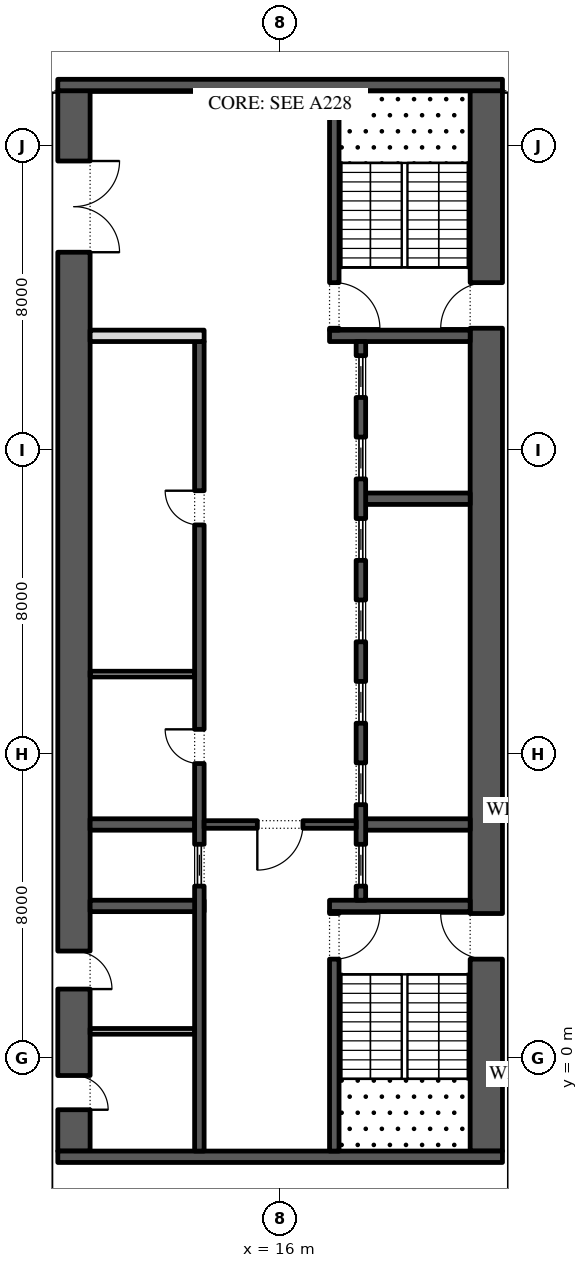
"""IFC4 building model, lengths in metres.
Left out: names, types, materials, properties, quantities, classifications, styles, units other than length and angle.
Written with IfcOpenShell. Run it as: python <this file> out.ifc"""

import sys

from ifc_helpers import new_model, si_unit, direction, frame, frame_2d, origin, place, context, subcontext, project, spatial, rectangle, extrude, element, fill, save


model = new_model("IFC4")
c1 = context("Model", 3, precision=1e-05, world=origin(), true_north=direction((0.0, 1.0)))
c2 = subcontext(c1, "Body", "Model", "MODEL_VIEW")
j1 = project(units=[si_unit("LENGTHUNIT", "METRE"), si_unit("PLANEANGLEUNIT", "RADIAN")], contexts=[c1])
p1 = place(None, origin())
s1 = spatial("IfcSite", under=j1, at=p1, CompositionType="ELEMENT")
p2 = place(p1, origin())
s2 = spatial("IfcBuilding", under=s1, at=p2, CompositionType="ELEMENT")
p3 = place(p2, frame((0.0, 0.0, 118.2)))
s3 = spatial("IfcBuildingStorey", under=s2, at=p3, CompositionType="ELEMENT", Elevation=118.2)
p4 = place(p3, frame((21.425, -2.45, 0.0), z_axis=(0.0, 0.0, 1.0), x_axis=(0.0, 1.0, 0.0)))
e1 = element("IfcWall", 1, at=p4, inside=s3, PredefinedType="SHEAR", context=c2, shape_type="SweptSolid", body=[
    extrude(rectangle(XDim=27.9, YDim=0.85, at=frame_2d((13.95, 0.0))), origin(), (0.0, 0.0, 1.0), 4.0),
])
p5 = place(p4, frame((5.05, 0.0, 0.0)))
e2 = element("IfcOpeningElement", 2, at=p5, cuts=e1, PredefinedType="OPENING", context=c2, shape_type="SweptSolid", body=[
    extrude(rectangle(XDim=1.2, YDim=2.1, at=frame_2d((0.6, 1.05))), frame((0.0, 0.435, 0.0), z_axis=(0.0, -1.0, 0.0), x_axis=(1.0, 0.0, 0.0)), (0.0, 0.0, 1.0), 0.87),
])
p6 = place(p4, frame((21.65, 0.0, 0.0)))
e3 = element("IfcOpeningElement", 3, at=p6, cuts=e1, PredefinedType="OPENING", context=c2, shape_type="SweptSolid", body=[
    extrude(rectangle(XDim=1.2, YDim=2.1, at=frame_2d((0.6, 1.05))), frame((0.0, 0.435, 0.0), z_axis=(0.0, -1.0, 0.0), x_axis=(1.0, 0.0, 0.0)), (0.0, 0.0, 1.0), 0.87),
])
p7 = place(p3, frame((10.575, -2.45, 0.0), z_axis=(0.0, 0.0, 1.0), x_axis=(0.0, 1.0, 0.0)))
e4 = element("IfcWall", 4, at=p7, inside=s3, PredefinedType="SHEAR", context=c2, shape_type="SweptSolid", body=[
    extrude(rectangle(XDim=27.9, YDim=0.85, at=frame_2d((13.95, 0.0))), origin(), (0.0, 0.0, 1.0), 4.0),
])
p8 = place(p7, frame((23.65, 0.0, 0.0)))
e5 = element("IfcOpeningElement", 5, at=p8, cuts=e4, PredefinedType="OPENING", context=c2, shape_type="SweptSolid", body=[
    extrude(rectangle(XDim=2.4, YDim=2.1, at=frame_2d((1.2, 1.05))), frame((0.0, 0.435, 0.0), z_axis=(0.0, -1.0, 0.0), x_axis=(1.0, 0.0, 0.0)), (0.0, 0.0, 1.0), 0.87),
])
p9 = place(p7, frame((1.087, 0.0, 0.0)))
e6 = element("IfcOpeningElement", 6, at=p9, cuts=e4, PredefinedType="OPENING", context=c2, shape_type="SweptSolid", body=[
    extrude(rectangle(XDim=0.9, YDim=2.1, at=frame_2d((0.45, 1.05))), frame((0.0, 0.435, 0.0), z_axis=(0.0, -1.0, 0.0), x_axis=(1.0, 0.0, 0.0)), (0.0, 0.0, 1.0), 0.87),
])
p10 = place(p7, frame((4.262, 0.0, 0.0)))
e7 = element("IfcOpeningElement", 7, at=p10, cuts=e4, PredefinedType="OPENING", context=c2, shape_type="SweptSolid", body=[
    extrude(rectangle(XDim=1.0, YDim=2.1, at=frame_2d((0.5, 1.05))), frame((0.0, 0.435, 0.0), z_axis=(0.0, -1.0, 0.0), x_axis=(1.0, 0.0, 0.0)), (0.0, 0.0, 1.0), 0.87),
])
for number, where, z_axis, x_axis in (
    (8, (10.15, -2.6, 0.0), (0.0, 0.0, 1.0), (1.0, 0.0, 0.0)),
    (9, (10.15, 25.6, 0.0), (0.0, 0.0, 1.0), (1.0, 0.0, 0.0)),
):
    element("IfcWall", number, at=place(p3, frame(where, z_axis=z_axis, x_axis=x_axis)), inside=s3, PredefinedType="SHEAR", context=c2, shape_type="SweptSolid", body=[
        extrude(rectangle(XDim=11.7, YDim=0.3, at=frame_2d((5.85, 0.0))), origin(), (0.0, 0.0, 1.0), 4.0),
    ])
p11 = place(p3, frame((17.3, 4.0, 0.0), z_axis=(0.0, 0.0, 1.0), x_axis=(1.0, 0.0, 0.0)))
e10 = element("IfcWall", 10, at=p11, inside=s3, PredefinedType="SHEAR", context=c2, shape_type="SweptSolid", body=[
    extrude(rectangle(XDim=3.7, YDim=0.3, at=frame_2d((1.85, 0.0))), origin(), (0.0, 0.0, 1.0), 4.0),
])
p12 = place(p3, frame((17.425, -2.45, 0.0), z_axis=(0.0, 0.0, 1.0), x_axis=(0.0, 1.0, 0.0)))
e11 = element("IfcWall", 11, at=p12, inside=s3, PredefinedType="SHEAR", context=c2, shape_type="SweptSolid", body=[
    extrude(rectangle(XDim=6.3, YDim=0.25, at=frame_2d((3.15, 0.0))), origin(), (0.0, 0.0, 1.0), 4.0),
])
p13 = place(p12, frame((5.05, 0.0, 0.0)))
e12 = element("IfcOpeningElement", 12, at=p13, cuts=e11, PredefinedType="OPENING", context=c2, shape_type="SweptSolid", body=[
    extrude(rectangle(XDim=1.2, YDim=2.1, at=frame_2d((0.6, 1.05))), frame((0.0, 0.135, 0.0), z_axis=(0.0, -1.0, 0.0), x_axis=(1.0, 0.0, 0.0)), (0.0, 0.0, 1.0), 0.27),
])
p14 = place(p3, frame((17.3, 19.0, 0.0), z_axis=(0.0, 0.0, 1.0), x_axis=(1.0, 0.0, 0.0)))
e13 = element("IfcWall", 13, at=p14, inside=s3, PredefinedType="SHEAR", context=c2, shape_type="SweptSolid", body=[
    extrude(rectangle(XDim=3.7, YDim=0.3, at=frame_2d((1.85, 0.0))), origin(), (0.0, 0.0, 1.0), 4.0),
])
p15 = place(p3, frame((17.425, 19.15, 0.0), z_axis=(0.0, 0.0, 1.0), x_axis=(0.0, 1.0, 0.0)))
e14 = element("IfcWall", 14, at=p15, inside=s3, PredefinedType="SHEAR", context=c2, shape_type="SweptSolid", body=[
    extrude(rectangle(XDim=6.3, YDim=0.25, at=frame_2d((3.15, 0.0))), origin(), (0.0, 0.0, 1.0), 4.0),
])
p16 = place(p15, frame((0.05, 0.0, 0.0)))
e15 = element("IfcOpeningElement", 15, at=p16, cuts=e14, PredefinedType="OPENING", context=c2, shape_type="SweptSolid", body=[
    extrude(rectangle(XDim=1.2, YDim=2.1, at=frame_2d((0.6, 1.05))), frame((0.0, 0.135, 0.0), z_axis=(0.0, -1.0, 0.0), x_axis=(1.0, 0.0, 0.0)), (0.0, 0.0, 1.0), 0.27),
])
for number, where, z_axis, x_axis in (
    (16, (18.25, 6.143, 0.0), (0.0, 0.0, 1.0), (1.0, 0.0, 0.0)),
    (17, (18.25, 14.714, 0.0), (0.0, 0.0, 1.0), (1.0, 0.0, 0.0)),
):
    element("IfcWall", number, at=place(p3, frame(where, z_axis=z_axis, x_axis=x_axis)), inside=s3, PredefinedType="SHEAR", context=c2, shape_type="SweptSolid", body=[
        extrude(rectangle(XDim=2.75, YDim=0.3, at=frame_2d((1.375, 0.0))), origin(), (0.0, 0.0, 1.0), 4.0),
    ])
p17 = place(p3, frame((18.125, 4.15, 0.0), z_axis=(0.0, 0.0, 1.0), x_axis=(0.0, 1.0, 0.0)))
e18 = element("IfcWall", 18, at=p17, inside=s3, PredefinedType="SHEAR", context=c2, shape_type="SweptSolid", body=[
    extrude(rectangle(XDim=14.7, YDim=0.25, at=frame_2d((7.35, 0.0))), origin(), (0.0, 0.0, 1.0), 4.0),
])
p18 = place(p17, frame((0.371, 0.0, 0.0)))
e19 = element("IfcOpeningElement", 19, at=p18, cuts=e18, PredefinedType="OPENING", context=c2, shape_type="SweptSolid", body=[
    extrude(rectangle(XDim=1.1, YDim=2.1, at=frame_2d((0.55, 1.05))), frame((0.0, 0.135, 0.0), z_axis=(0.0, -1.0, 0.0), x_axis=(1.0, 0.0, 0.0)), (0.0, 0.0, 1.0), 0.27),
])
p19 = place(p17, frame((2.514, 0.0, 0.0)))
e20 = element("IfcOpeningElement", 20, at=p19, cuts=e18, PredefinedType="OPENING", context=c2, shape_type="SweptSolid", body=[
    extrude(rectangle(XDim=1.1, YDim=2.1, at=frame_2d((0.55, 1.05))), frame((0.0, 0.135, 0.0), z_axis=(0.0, -1.0, 0.0), x_axis=(1.0, 0.0, 0.0)), (0.0, 0.0, 1.0), 0.27),
])
p20 = place(p17, frame((4.657, 0.0, 0.0)))
e21 = element("IfcOpeningElement", 21, at=p20, cuts=e18, PredefinedType="OPENING", context=c2, shape_type="SweptSolid", body=[
    extrude(rectangle(XDim=1.1, YDim=2.1, at=frame_2d((0.55, 1.05))), frame((0.0, 0.135, 0.0), z_axis=(0.0, -1.0, 0.0), x_axis=(1.0, 0.0, 0.0)), (0.0, 0.0, 1.0), 0.27),
])
p21 = place(p17, frame((6.8, 0.0, 0.0)))
e22 = element("IfcOpeningElement", 22, at=p21, cuts=e18, PredefinedType="OPENING", context=c2, shape_type="SweptSolid", body=[
    extrude(rectangle(XDim=1.1, YDim=2.1, at=frame_2d((0.55, 1.05))), frame((0.0, 0.135, 0.0), z_axis=(0.0, -1.0, 0.0), x_axis=(1.0, 0.0, 0.0)), (0.0, 0.0, 1.0), 0.27),
])
p22 = place(p17, frame((8.943, 0.0, 0.0)))
e23 = element("IfcOpeningElement", 23, at=p22, cuts=e18, PredefinedType="OPENING", context=c2, shape_type="SweptSolid", body=[
    extrude(rectangle(XDim=1.1, YDim=2.1, at=frame_2d((0.55, 1.05))), frame((0.0, 0.135, 0.0), z_axis=(0.0, -1.0, 0.0), x_axis=(1.0, 0.0, 0.0)), (0.0, 0.0, 1.0), 0.27),
])
p23 = place(p17, frame((11.086, 0.0, 0.0)))
e24 = element("IfcOpeningElement", 24, at=p23, cuts=e18, PredefinedType="OPENING", context=c2, shape_type="SweptSolid", body=[
    extrude(rectangle(XDim=1.1, YDim=2.1, at=frame_2d((0.55, 1.05))), frame((0.0, 0.135, 0.0), z_axis=(0.0, -1.0, 0.0), x_axis=(1.0, 0.0, 0.0)), (0.0, 0.0, 1.0), 0.27),
])
p24 = place(p17, frame((13.229, 0.0, 0.0)))
e25 = element("IfcOpeningElement", 25, at=p24, cuts=e18, PredefinedType="OPENING", context=c2, shape_type="SweptSolid", body=[
    extrude(rectangle(XDim=1.1, YDim=2.1, at=frame_2d((0.55, 1.05))), frame((0.0, 0.135, 0.0), z_axis=(0.0, -1.0, 0.0), x_axis=(1.0, 0.0, 0.0)), (0.0, 0.0, 1.0), 0.27),
])
p25 = place(p3, frame((11.0, 4.0, 0.0), z_axis=(0.0, 0.0, 1.0), x_axis=(1.0, 0.0, 0.0)))
e26 = element("IfcWall", 26, at=p25, inside=s3, PredefinedType="SHEAR", context=c2, shape_type="SweptSolid", body=[
    extrude(rectangle(XDim=3.0, YDim=0.3, at=frame_2d((1.5, 0.0))), origin(), (0.0, 0.0, 1.0), 4.0),
])
p26 = place(p3, frame((11.0, 6.143, 0.0), z_axis=(0.0, 0.0, 1.0), x_axis=(1.0, 0.0, 0.0)))
e27 = element("IfcWall", 27, at=p26, inside=s3, PredefinedType="SHEAR", context=c2, shape_type="SweptSolid", body=[
    extrude(rectangle(XDim=2.75, YDim=0.3, at=frame_2d((1.375, 0.0))), origin(), (0.0, 0.0, 1.0), 4.0),
])
p27 = place(p3, frame((13.875, -2.45, 0.0), z_axis=(0.0, 0.0, 1.0), x_axis=(0.0, 1.0, 0.0)))
e28 = element("IfcWall", 28, at=p27, inside=s3, PredefinedType="SHEAR", context=c2, shape_type="SweptSolid", body=[
    extrude(rectangle(XDim=21.3, YDim=0.25, at=frame_2d((10.65, 0.0))), origin(), (0.0, 0.0, 1.0), 4.0),
])
p28 = place(p27, frame((10.196, 0.0, 0.0)))
e29 = element("IfcOpeningElement", 29, at=p28, cuts=e28, PredefinedType="OPENING", context=c2, shape_type="SweptSolid", body=[
    extrude(rectangle(XDim=0.9, YDim=2.1, at=frame_2d((0.45, 1.05))), frame((0.0, 0.135, 0.0), z_axis=(0.0, -1.0, 0.0), x_axis=(1.0, 0.0, 0.0)), (0.0, 0.0, 1.0), 0.27),
])
p29 = place(p27, frame((16.475, 0.0, 0.0)))
e30 = element("IfcOpeningElement", 30, at=p29, cuts=e28, PredefinedType="OPENING", context=c2, shape_type="SweptSolid", body=[
    extrude(rectangle(XDim=0.9, YDim=2.1, at=frame_2d((0.45, 1.05))), frame((0.0, 0.135, 0.0), z_axis=(0.0, -1.0, 0.0), x_axis=(1.0, 0.0, 0.0)), (0.0, 0.0, 1.0), 0.27),
])
p30 = place(p27, frame((6.971, 0.0, 0.0)))
e31 = element("IfcOpeningElement", 31, at=p30, cuts=e28, PredefinedType="OPENING", context=c2, shape_type="SweptSolid", body=[
    extrude(rectangle(XDim=1.1, YDim=2.1, at=frame_2d((0.55, 1.05))), frame((0.0, 0.135, 0.0), z_axis=(0.0, -1.0, 0.0), x_axis=(1.0, 0.0, 0.0)), (0.0, 0.0, 1.0), 0.27),
])
p31 = place(p3, frame((11.0, 19.0, 0.0), z_axis=(0.0, 0.0, 1.0), x_axis=(1.0, 0.0, 0.0)))
e32 = element("IfcWall", 32, at=p31, inside=s3, PredefinedType="PARTITIONING", context=c2, shape_type="SweptSolid", body=[
    extrude(rectangle(XDim=3.0, YDim=0.3, at=frame_2d((1.5, 0.0))), origin(), (0.0, 0.0, 1.0), 4.0),
])
p32 = place(p3, frame((11.0, 10.1, 0.0), z_axis=(0.0, 0.0, 1.0), x_axis=(1.0, 0.0, 0.0)))
e33 = element("IfcWall", 33, at=p32, inside=s3, PredefinedType="PARTITIONING", context=c2, shape_type="SweptSolid", body=[
    extrude(rectangle(XDim=2.75, YDim=0.15, at=frame_2d((1.375, 0.0))), origin(), (0.0, 0.0, 1.0), 4.0),
])
p33 = place(p3, frame((14.0, 6.143, 0.0), z_axis=(0.0, 0.0, 1.0), x_axis=(1.0, 0.0, 0.0)))
e34 = element("IfcWall", 34, at=p33, inside=s3, PredefinedType="SHEAR", context=c2, shape_type="SweptSolid", body=[
    extrude(rectangle(XDim=4.0, YDim=0.2, at=frame_2d((2.0, 0.0))), origin(), (0.0, 0.0, 1.0), 4.0),
])
p34 = place(p33, frame((1.4, 0.0, 0.0)))
e35 = element("IfcOpeningElement", 35, at=p34, cuts=e34, PredefinedType="OPENING", context=c2, shape_type="SweptSolid", body=[
    extrude(rectangle(XDim=1.2, YDim=2.1, at=frame_2d((0.6, 1.05))), frame((0.0, 0.11, 0.0), z_axis=(0.0, -1.0, 0.0), x_axis=(1.0, 0.0, 0.0)), (0.0, 0.0, 1.0), 0.22),
])
p35 = place(p3, frame((11.0, 0.7, 0.0), z_axis=(0.0, 0.0, 1.0), x_axis=(1.0, 0.0, 0.0)))
e36 = element("IfcWall", 36, at=p35, inside=s3, PredefinedType="PARTITIONING", context=c2, shape_type="SweptSolid", body=[
    extrude(rectangle(XDim=2.75, YDim=0.15, at=frame_2d((1.375, 0.0))), origin(), (0.0, 0.0, 1.0), 4.0),
])
p36 = place(p18, origin())
e37 = element("IfcDoor", 37, at=p36, inside=s3, OperationType="SLIDING_TO_LEFT", PredefinedType="DOOR", context=c2, shape_type="SweptSolid", body=[
    extrude(rectangle(XDim=1.1, YDim=2.1, at=frame_2d((0.55, 1.05))), frame((0.0, 0.025, 0.0), z_axis=(0.0, -1.0, 0.0), x_axis=(1.0, 0.0, 0.0)), (0.0, 0.0, 1.0), 0.05),
])
fill(e19, e37)
p37 = place(p19, origin())
e38 = element("IfcDoor", 38, at=p37, inside=s3, OperationType="SLIDING_TO_LEFT", PredefinedType="DOOR", context=c2, shape_type="SweptSolid", body=[
    extrude(rectangle(XDim=1.1, YDim=2.1, at=frame_2d((0.55, 1.05))), frame((0.0, 0.025, 0.0), z_axis=(0.0, -1.0, 0.0), x_axis=(1.0, 0.0, 0.0)), (0.0, 0.0, 1.0), 0.05),
])
fill(e20, e38)
p38 = place(p20, origin())
e39 = element("IfcDoor", 39, at=p38, inside=s3, OperationType="SLIDING_TO_LEFT", PredefinedType="DOOR", context=c2, shape_type="SweptSolid", body=[
    extrude(rectangle(XDim=1.1, YDim=2.1, at=frame_2d((0.55, 1.05))), frame((0.0, 0.025, 0.0), z_axis=(0.0, -1.0, 0.0), x_axis=(1.0, 0.0, 0.0)), (0.0, 0.0, 1.0), 0.05),
])
fill(e21, e39)
p39 = place(p21, origin())
e40 = element("IfcDoor", 40, at=p39, inside=s3, OperationType="SLIDING_TO_LEFT", PredefinedType="DOOR", context=c2, shape_type="SweptSolid", body=[
    extrude(rectangle(XDim=1.1, YDim=2.1, at=frame_2d((0.55, 1.05))), frame((0.0, 0.025, 0.0), z_axis=(0.0, -1.0, 0.0), x_axis=(1.0, 0.0, 0.0)), (0.0, 0.0, 1.0), 0.05),
])
fill(e22, e40)
p40 = place(p22, origin())
e41 = element("IfcDoor", 41, at=p40, inside=s3, OperationType="SLIDING_TO_LEFT", PredefinedType="DOOR", context=c2, shape_type="SweptSolid", body=[
    extrude(rectangle(XDim=1.1, YDim=2.1, at=frame_2d((0.55, 1.05))), frame((0.0, 0.025, 0.0), z_axis=(0.0, -1.0, 0.0), x_axis=(1.0, 0.0, 0.0)), (0.0, 0.0, 1.0), 0.05),
])
fill(e23, e41)
p41 = place(p23, origin())
e42 = element("IfcDoor", 42, at=p41, inside=s3, OperationType="SLIDING_TO_LEFT", PredefinedType="DOOR", context=c2, shape_type="SweptSolid", body=[
    extrude(rectangle(XDim=1.1, YDim=2.1, at=frame_2d((0.55, 1.05))), frame((0.0, 0.025, 0.0), z_axis=(0.0, -1.0, 0.0), x_axis=(1.0, 0.0, 0.0)), (0.0, 0.0, 1.0), 0.05),
])
fill(e24, e42)
p42 = place(p24, origin())
e43 = element("IfcDoor", 43, at=p42, inside=s3, OperationType="SLIDING_TO_LEFT", PredefinedType="DOOR", context=c2, shape_type="SweptSolid", body=[
    extrude(rectangle(XDim=1.1, YDim=2.1, at=frame_2d((0.55, 1.05))), frame((0.0, 0.025, 0.0), z_axis=(0.0, -1.0, 0.0), x_axis=(1.0, 0.0, 0.0)), (0.0, 0.0, 1.0), 0.05),
])
fill(e25, e43)
p43 = place(p28, origin())
e44 = element("IfcDoor", 44, at=p43, inside=s3, OperationType="SINGLE_SWING_LEFT", PredefinedType="DOOR", context=c2, shape_type="SweptSolid", body=[
    extrude(rectangle(XDim=0.9, YDim=2.1, at=frame_2d((0.45, 1.05))), frame((0.0, 0.125, 0.0), z_axis=(0.0, -1.0, 0.0), x_axis=(1.0, 0.0, 0.0)), (0.0, 0.0, 1.0), 0.05),
])
fill(e29, e44)
p44 = place(p29, origin())
e45 = element("IfcDoor", 45, at=p44, inside=s3, OperationType="SINGLE_SWING_LEFT", PredefinedType="DOOR", context=c2, shape_type="SweptSolid", body=[
    extrude(rectangle(XDim=0.9, YDim=2.1, at=frame_2d((0.45, 1.05))), frame((0.0, 0.125, 0.0), z_axis=(0.0, -1.0, 0.0), x_axis=(1.0, 0.0, 0.0)), (0.0, 0.0, 1.0), 0.05),
])
fill(e30, e45)
p45 = place(p30, origin())
e46 = element("IfcDoor", 46, at=p45, inside=s3, OperationType="SLIDING_TO_LEFT", PredefinedType="DOOR", context=c2, shape_type="SweptSolid", body=[
    extrude(rectangle(XDim=1.1, YDim=2.1, at=frame_2d((0.55, 1.05))), frame((0.0, 0.025, 0.0), z_axis=(0.0, -1.0, 0.0), x_axis=(1.0, 0.0, 0.0)), (0.0, 0.0, 1.0), 0.05),
])
fill(e31, e46)
p46 = place(p34, frame((1.2, 0.0, 0.0), z_axis=(0.0, 0.0, 1.0), x_axis=(-1.0, 0.0, 0.0)))
e47 = element("IfcDoor", 47, at=p46, inside=s3, OperationType="SINGLE_SWING_LEFT", PredefinedType="DOOR", context=c2, shape_type="SweptSolid", body=[
    extrude(rectangle(XDim=1.2, YDim=2.1, at=frame_2d((0.6, 1.05))), frame((0.0, 0.025, 0.0), z_axis=(0.0, -1.0, 0.0), x_axis=(1.0, 0.0, 0.0)), (0.0, 0.0, 1.0), 0.05),
])
fill(e35, e47)
p47 = place(p8, frame((2.4, 0.0, 0.0), z_axis=(0.0, 0.0, 1.0), x_axis=(-1.0, 0.0, 0.0)))
e48 = element("IfcDoor", 48, at=p47, inside=s3, OperationType="DOUBLE_DOOR_SINGLE_SWING", PredefinedType="DOOR", context=c2, shape_type="SweptSolid", body=[
    extrude(rectangle(XDim=2.4, YDim=2.1, at=frame_2d((1.2, 1.05))), frame((0.0, 0.025, 0.0), z_axis=(0.0, -1.0, 0.0), x_axis=(1.0, 0.0, 0.0)), (0.0, 0.0, 1.0), 0.05),
])
fill(e5, e48)
p48 = place(p13, frame((1.2, 0.0, 0.0), z_axis=(0.0, 0.0, 1.0), x_axis=(-1.0, 0.0, 0.0)))
e49 = element("IfcDoor", 49, at=p48, inside=s3, OperationType="SINGLE_SWING_RIGHT", PredefinedType="DOOR", context=c2, shape_type="SweptSolid", body=[
    extrude(rectangle(XDim=1.2, YDim=2.1, at=frame_2d((0.6, 1.05))), frame((0.0, 0.025, 0.0), z_axis=(0.0, -1.0, 0.0), x_axis=(1.0, 0.0, 0.0)), (0.0, 0.0, 1.0), 0.05),
])
fill(e12, e49)
p49 = place(p5, origin())
e50 = element("IfcDoor", 50, at=p49, inside=s3, OperationType="SINGLE_SWING_LEFT", PredefinedType="DOOR", context=c2, shape_type="SweptSolid", body=[
    extrude(rectangle(XDim=1.2, YDim=2.1, at=frame_2d((0.6, 1.05))), frame((0.0, 0.025, 0.0), z_axis=(0.0, -1.0, 0.0), x_axis=(1.0, 0.0, 0.0)), (0.0, 0.0, 1.0), 0.05),
])
fill(e2, e50)
p50 = place(p16, frame((1.2, 0.0, 0.0), z_axis=(0.0, 0.0, 1.0), x_axis=(-1.0, 0.0, 0.0)))
e51 = element("IfcDoor", 51, at=p50, inside=s3, OperationType="SINGLE_SWING_LEFT", PredefinedType="DOOR", context=c2, shape_type="SweptSolid", body=[
    extrude(rectangle(XDim=1.2, YDim=2.1, at=frame_2d((0.6, 1.05))), frame((0.0, 0.025, 0.0), z_axis=(0.0, -1.0, 0.0), x_axis=(1.0, 0.0, 0.0)), (0.0, 0.0, 1.0), 0.05),
])
fill(e15, e51)
p51 = place(p6, origin())
e52 = element("IfcDoor", 52, at=p51, inside=s3, OperationType="SINGLE_SWING_RIGHT", PredefinedType="DOOR", context=c2, shape_type="SweptSolid", body=[
    extrude(rectangle(XDim=1.2, YDim=2.1, at=frame_2d((0.6, 1.05))), frame((0.0, 0.025, 0.0), z_axis=(0.0, -1.0, 0.0), x_axis=(1.0, 0.0, 0.0)), (0.0, 0.0, 1.0), 0.05),
])
fill(e3, e52)
p52 = place(p9, frame((0.9, -0.8, 0.0), z_axis=(0.0, 0.0, 1.0), x_axis=(-1.0, 0.0, 0.0)))
e53 = element("IfcDoor", 53, at=p52, inside=s3, OperationType="SINGLE_SWING_LEFT", PredefinedType="DOOR", context=c2, shape_type="SweptSolid", body=[
    extrude(rectangle(XDim=0.9, YDim=2.1, at=frame_2d((0.45, 1.05))), frame((0.0, -0.375, 0.0), z_axis=(0.0, -1.0, 0.0), x_axis=(1.0, 0.0, 0.0)), (0.0, 0.0, 1.0), 0.05),
])
fill(e6, e53)
p53 = place(p10, frame((1.0, -0.8, 0.0), z_axis=(0.0, 0.0, 1.0), x_axis=(-1.0, 0.0, 0.0)))
e54 = element("IfcDoor", 54, at=p53, inside=s3, OperationType="SINGLE_SWING_LEFT", PredefinedType="DOOR", context=c2, shape_type="SweptSolid", body=[
    extrude(rectangle(XDim=1.0, YDim=2.1, at=frame_2d((0.5, 1.05))), frame((0.0, -0.375, 0.0), z_axis=(0.0, -1.0, 0.0), x_axis=(1.0, 0.0, 0.0)), (0.0, 0.0, 1.0), 0.05),
])
fill(e7, e54)
save(model, sys.argv[1])
